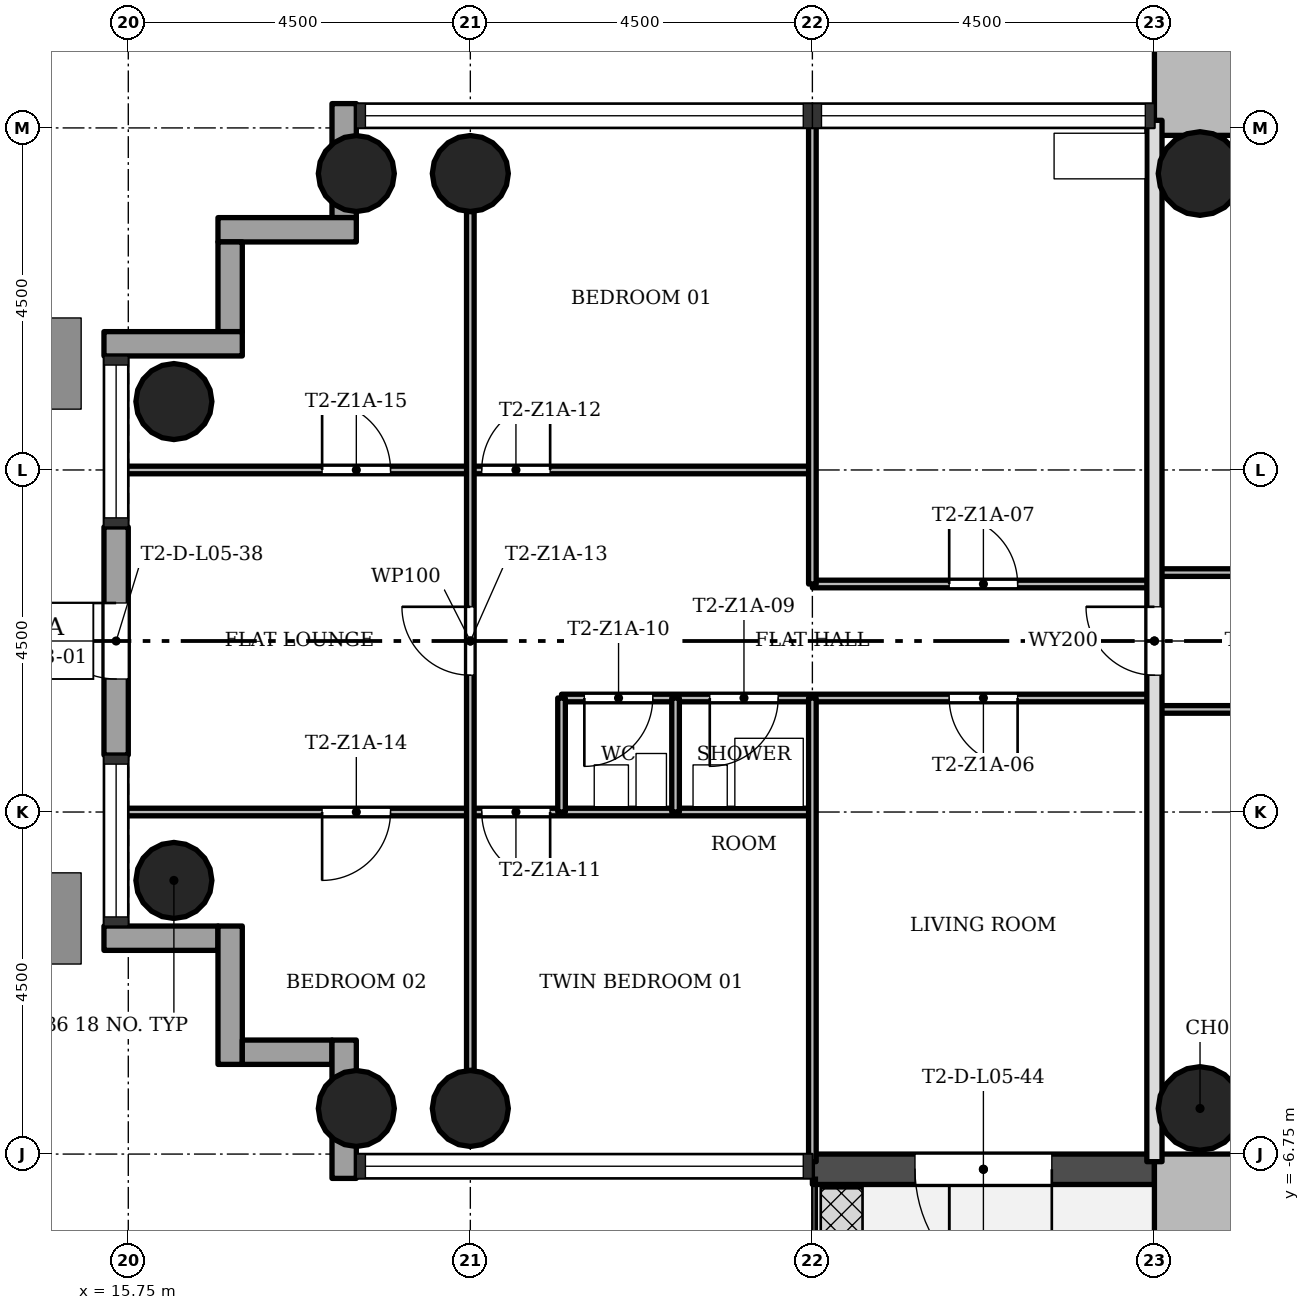
"""IFC4 building model, lengths in metres.
Left out: names, types, materials, properties, quantities, classifications, styles, units other than length and angle.
Written with IfcOpenShell. Run it as: python <this file> out.ifc"""

import sys

from ifc_helpers import new_model, si_unit, direction, frame, frame_2d, origin, origin_2d, place, context, subcontext, project, spatial, rectangle, hollow_circle, extrude, element, fill, save


model = new_model("IFC4")
c1 = context("Model", 3, precision=1e-05, world=origin(), true_north=direction((0.0, 1.0)))
c2 = subcontext(c1, "Body", "Model", "MODEL_VIEW")
j1 = project(units=[si_unit("LENGTHUNIT", "METRE"), si_unit("PLANEANGLEUNIT", "RADIAN")], contexts=[c1])
p1 = place(None, origin())
s1 = spatial("IfcSite", under=j1, at=p1, CompositionType="ELEMENT")
p2 = place(p1, origin())
s2 = spatial("IfcBuilding", under=s1, at=p2, CompositionType="ELEMENT")
p3 = place(p2, frame((0.0, 0.0, 24.5)))
s3 = spatial("IfcBuildingStorey", under=s2, at=p3, CompositionType="ELEMENT", Elevation=24.5)
p4 = place(p3, frame((29.8, 15.248, 0.0), z_axis=(0.0, 0.0, 1.0), x_axis=(0.0, -1.0, 0.0)))
e1 = element("IfcWall", 1, at=p4, inside=s3, PredefinedType="SHEAR", context=c2, shape_type="SweptSolid", body=[
    extrude(rectangle(XDim=8.596, YDim=1.1, at=frame_2d((4.298, 0.0))), origin(), (0.0, 0.0, 1.0), 3.4),
])
p5 = place(p3, frame((41.65, -7.3, 0.0), z_axis=(0.0, 0.0, 1.0), x_axis=(-1.0, 0.0, 0.0)))
e2 = element("IfcWall", 2, at=p5, inside=s3, PredefinedType="SHEAR", context=c2, shape_type="SweptSolid", body=[
    extrude(rectangle(XDim=12.4, YDim=1.1, at=frame_2d((6.2, 0.0))), origin(), (0.0, 0.0, 1.0), 3.4),
])
p6 = place(p5, frame((4.75, 0.0, 0.0)))
e3 = element("IfcOpeningElement", 3, at=p6, cuts=e2, PredefinedType="OPENING", context=c2, shape_type="SweptSolid", body=[
    extrude(rectangle(XDim=1.8, YDim=2.1, at=frame_2d((0.9, 1.05))), frame((0.0, 0.56, 0.0), z_axis=(0.0, -1.0, 0.0), x_axis=(1.0, 0.0, 0.0)), (0.0, 0.0, 1.0), 1.12),
])
for number, where, z_axis, x_axis in (
    (4, (20.25, 6.15, 0.0), (0.0, 0.0, 1.0), (1.0, 0.0, 0.0)),
    (5, (20.25, -6.15, 0.0), (0.0, 0.0, 1.0), (1.0, 0.0, 0.0)),
    (6, (18.75, 6.15, 0.0), (0.0, 0.0, 1.0), (1.0, 0.0, 0.0)),
    (7, (18.75, -6.15, 0.0), (0.0, 0.0, 1.0), (1.0, 0.0, 0.0)),
    (8, (16.35, 3.15, 0.0), (0.0, 0.0, 1.0), (1.0, 0.0, 0.0)),
    (9, (16.35, -3.15, 0.0), (0.0, 0.0, 1.0), (1.0, 0.0, 0.0)),
):
    element("IfcColumn", number, at=place(p3, frame(where, z_axis=z_axis, x_axis=x_axis)), inside=s3, PredefinedType="COLUMN", context=c2, shape_type="SweptSolid", body=[
        extrude(hollow_circle(Radius=0.5, WallThickness=0.036, at=origin_2d()), origin(), (0.0, 0.0, 1.0), 3.4),
    ])
for number, where, z_axis, x_axis in (
    (10, (29.85, 6.15, 0.0), (0.0, 0.0, 1.0), (1.0, 0.0, 0.0)),
    (11, (29.85, -6.15, 0.0), (0.0, 0.0, 1.0), (1.0, 0.0, 0.0)),
):
    element("IfcColumn", number, at=place(p3, frame(where, z_axis=z_axis, x_axis=x_axis)), inside=s3, PredefinedType="COLUMN", context=c2, shape_type="SweptSolid", body=[
        extrude(hollow_circle(Radius=0.55, WallThickness=0.04, at=origin_2d()), origin(), (0.0, 0.0, 1.0), 3.4),
    ])
p7 = place(p3, frame((18.59, 7.07, 0.0), z_axis=(0.0, 0.0, 1.0), x_axis=(0.0, -1.0, 0.0)))
e12 = element("IfcWall", 12, at=p7, inside=s3, PredefinedType="STANDARD", context=c2, shape_type="SweptSolid", body=[
    extrude(rectangle(XDim=1.5, YDim=0.32, at=frame_2d((0.75, 0.0))), origin(), (0.0, 0.0, 1.0), 3.1),
])
p8 = place(p3, frame((18.75, 5.41, 0.0), z_axis=(0.0, 0.0, 1.0), x_axis=(-1.0, 0.0, 0.0)))
e13 = element("IfcWall", 13, at=p8, inside=s3, PredefinedType="STANDARD", context=c2, shape_type="SweptSolid", body=[
    extrude(rectangle(XDim=1.82, YDim=0.32, at=frame_2d((0.91, 0.0))), origin(), (0.0, 0.0, 1.0), 3.1),
])
p9 = place(p3, frame((17.09, 5.25, 0.0), z_axis=(0.0, 0.0, 1.0), x_axis=(0.0, -1.0, 0.0)))
e14 = element("IfcWall", 14, at=p9, inside=s3, PredefinedType="STANDARD", context=c2, shape_type="SweptSolid", body=[
    extrude(rectangle(XDim=1.18, YDim=0.32, at=frame_2d((0.59, 0.0))), origin(), (0.0, 0.0, 1.0), 3.1),
])
p10 = place(p3, frame((17.25, 3.91, 0.0), z_axis=(0.0, 0.0, 1.0), x_axis=(-1.0, 0.0, 0.0)))
e15 = element("IfcWall", 15, at=p10, inside=s3, PredefinedType="STANDARD", context=c2, shape_type="SweptSolid", body=[
    extrude(rectangle(XDim=1.82, YDim=0.32, at=frame_2d((0.91, 0.0))), origin(), (0.0, 0.0, 1.0), 3.1),
])
p11 = place(p3, frame((15.59, 1.5, 0.0), z_axis=(0.0, 0.0, 1.0), x_axis=(0.0, -1.0, 0.0)))
e16 = element("IfcWall", 16, at=p11, inside=s3, PredefinedType="STANDARD", context=c2, shape_type="SweptSolid", body=[
    extrude(rectangle(XDim=3.0, YDim=0.32, at=frame_2d((1.5, 0.0))), origin(), (0.0, 0.0, 1.0), 3.1),
])
p12 = place(p11, frame((1.0, 0.0, 0.0)))
e17 = element("IfcOpeningElement", 17, at=p12, cuts=e16, PredefinedType="OPENING", context=c2, shape_type="SweptSolid", body=[
    extrude(rectangle(XDim=1.0, YDim=2.1, at=frame_2d((0.5, 1.05))), frame((0.0, 0.17, 0.0), z_axis=(0.0, -1.0, 0.0), x_axis=(1.0, 0.0, 0.0)), (0.0, 0.0, 1.0), 0.34),
])
p13 = place(p3, frame((15.43, -3.91, 0.0), z_axis=(0.0, 0.0, 1.0), x_axis=(1.0, 0.0, 0.0)))
e18 = element("IfcWall", 18, at=p13, inside=s3, PredefinedType="STANDARD", context=c2, shape_type="SweptSolid", body=[
    extrude(rectangle(XDim=1.5, YDim=0.32, at=frame_2d((0.75, 0.0))), origin(), (0.0, 0.0, 1.0), 3.1),
])
p14 = place(p3, frame((17.09, -3.75, 0.0), z_axis=(0.0, 0.0, 1.0), x_axis=(0.0, -1.0, 0.0)))
e19 = element("IfcWall", 19, at=p14, inside=s3, PredefinedType="STANDARD", context=c2, shape_type="SweptSolid", body=[
    extrude(rectangle(XDim=1.82, YDim=0.32, at=frame_2d((0.91, 0.0))), origin(), (0.0, 0.0, 1.0), 3.1),
])
p15 = place(p3, frame((17.25, -5.41, 0.0), z_axis=(0.0, 0.0, 1.0), x_axis=(1.0, 0.0, 0.0)))
e20 = element("IfcWall", 20, at=p15, inside=s3, PredefinedType="STANDARD", context=c2, shape_type="SweptSolid", body=[
    extrude(rectangle(XDim=1.18, YDim=0.32, at=frame_2d((0.59, 0.0))), origin(), (0.0, 0.0, 1.0), 3.1),
])
p16 = place(p3, frame((18.59, -5.25, 0.0), z_axis=(0.0, 0.0, 1.0), x_axis=(0.0, -1.0, 0.0)))
e21 = element("IfcWall", 21, at=p16, inside=s3, PredefinedType="STANDARD", context=c2, shape_type="SweptSolid", body=[
    extrude(rectangle(XDim=1.82, YDim=0.32, at=frame_2d((0.91, 0.0))), origin(), (0.0, 0.0, 1.0), 3.1),
])
p17 = place(p3, frame((24.75, -6.95, 0.0), z_axis=(0.0, 0.0, 1.0), x_axis=(1.0, 0.0, 0.0)))
e22 = element("IfcWall", 22, at=p17, inside=s3, PredefinedType="STANDARD", context=c2, shape_type="SweptSolid", body=[
    extrude(rectangle(XDim=4.5, YDim=0.4, at=frame_2d((2.25, 0.0))), origin(), (0.0, 0.0, 1.0), 3.1),
])
p18 = place(p17, frame((1.35, 0.0, 0.0)))
e23 = element("IfcOpeningElement", 23, at=p18, cuts=e22, PredefinedType="OPENING", context=c2, shape_type="SweptSolid", body=[
    extrude(rectangle(XDim=1.8, YDim=2.1, at=frame_2d((0.9, 1.05))), frame((0.0, 0.21, 0.0), z_axis=(0.0, -1.0, 0.0), x_axis=(1.0, 0.0, 0.0)), (0.0, 0.0, 1.0), 0.42),
])
p19 = place(p3, frame((24.75, -2.25, 0.0), z_axis=(0.0, 0.0, 1.0), x_axis=(-1.0, 0.0, 0.0)))
e24 = element("IfcWall", 24, at=p19, inside=s3, PredefinedType="PARTITIONING", context=c2, shape_type="SweptSolid", body=[
    extrude(rectangle(XDim=9.1, YDim=0.1, at=frame_2d((4.55, 0.0))), origin(), (0.0, 0.0, 1.0), 3.0),
])
p20 = place(p19, frame((3.45, 0.0, 0.0)))
e25 = element("IfcOpeningElement", 25, at=p20, cuts=e24, PredefinedType="OPENING", context=c2, shape_type="SweptSolid", body=[
    extrude(rectangle(XDim=0.9, YDim=2.1, at=frame_2d((0.45, 1.05))), frame((0.0, 0.06, 0.0), z_axis=(0.0, -1.0, 0.0), x_axis=(1.0, 0.0, 0.0)), (0.0, 0.0, 1.0), 0.12),
])
p21 = place(p19, frame((5.55, 0.0, 0.0)))
e26 = element("IfcOpeningElement", 26, at=p21, cuts=e24, PredefinedType="OPENING", context=c2, shape_type="SweptSolid", body=[
    extrude(rectangle(XDim=0.9, YDim=2.1, at=frame_2d((0.45, 1.05))), frame((0.0, 0.06, 0.0), z_axis=(0.0, -1.0, 0.0), x_axis=(1.0, 0.0, 0.0)), (0.0, 0.0, 1.0), 0.12),
])
p22 = place(p3, frame((34.5, -0.9, 0.0), z_axis=(0.0, 0.0, 1.0), x_axis=(-1.0, 0.0, 0.0)))
e27 = element("IfcWall", 27, at=p22, inside=s3, PredefinedType="PARTITIONING", context=c2, shape_type="SweptSolid", body=[
    extrude(rectangle(XDim=5.25, YDim=0.1, at=frame_2d((2.625, 0.0))), origin(), (0.0, 0.0, 1.0), 3.0),
])
p23 = place(p3, frame((29.25, -0.75, 0.0), z_axis=(0.0, 0.0, 1.0), x_axis=(-1.0, 0.0, 0.0)))
e28 = element("IfcWall", 28, at=p23, inside=s3, PredefinedType="PARTITIONING", context=c2, shape_type="SweptSolid", body=[
    extrude(rectangle(XDim=7.8, YDim=0.1, at=frame_2d((3.9, 0.0))), origin(), (0.0, 0.0, 1.0), 3.0),
])
p24 = place(p23, frame((1.8, 0.0, 0.0)))
e29 = element("IfcOpeningElement", 29, at=p24, cuts=e28, PredefinedType="OPENING", context=c2, shape_type="SweptSolid", body=[
    extrude(rectangle(XDim=0.9, YDim=2.1, at=frame_2d((0.45, 1.05))), frame((0.0, 0.06, 0.0), z_axis=(0.0, -1.0, 0.0), x_axis=(1.0, 0.0, 0.0)), (0.0, 0.0, 1.0), 0.12),
])
p25 = place(p23, frame((4.95, 0.0, 0.0)))
e30 = element("IfcOpeningElement", 30, at=p25, cuts=e28, PredefinedType="OPENING", context=c2, shape_type="SweptSolid", body=[
    extrude(rectangle(XDim=0.9, YDim=2.1, at=frame_2d((0.45, 1.05))), frame((0.0, 0.06, 0.0), z_axis=(0.0, -1.0, 0.0), x_axis=(1.0, 0.0, 0.0)), (0.0, 0.0, 1.0), 0.12),
])
p26 = place(p23, frame((6.6, 0.0, 0.0)))
e31 = element("IfcOpeningElement", 31, at=p26, cuts=e28, PredefinedType="OPENING", context=c2, shape_type="SweptSolid", body=[
    extrude(rectangle(XDim=0.9, YDim=2.1, at=frame_2d((0.45, 1.05))), frame((0.0, 0.06, 0.0), z_axis=(0.0, -1.0, 0.0), x_axis=(1.0, 0.0, 0.0)), (0.0, 0.0, 1.0), 0.12),
])
p27 = place(p3, frame((29.25, 0.75, 0.0), z_axis=(0.0, 0.0, 1.0), x_axis=(-1.0, 0.0, 0.0)))
e32 = element("IfcWall", 32, at=p27, inside=s3, PredefinedType="PARTITIONING", context=c2, shape_type="SweptSolid", body=[
    extrude(rectangle(XDim=4.5, YDim=0.1, at=frame_2d((2.25, 0.0))), origin(), (0.0, 0.0, 1.0), 3.0),
])
p28 = place(p27, frame((1.8, 0.0, 0.0)))
e33 = element("IfcOpeningElement", 33, at=p28, cuts=e32, PredefinedType="OPENING", context=c2, shape_type="SweptSolid", body=[
    extrude(rectangle(XDim=0.9, YDim=2.1, at=frame_2d((0.45, 1.05))), frame((0.0, 0.06, 0.0), z_axis=(0.0, -1.0, 0.0), x_axis=(1.0, 0.0, 0.0)), (0.0, 0.0, 1.0), 0.12),
])
p29 = place(p3, frame((34.5, 0.9, 0.0), z_axis=(0.0, 0.0, 1.0), x_axis=(-1.0, 0.0, 0.0)))
e34 = element("IfcWall", 34, at=p29, inside=s3, PredefinedType="PARTITIONING", context=c2, shape_type="SweptSolid", body=[
    extrude(rectangle(XDim=5.25, YDim=0.1, at=frame_2d((2.625, 0.0))), origin(), (0.0, 0.0, 1.0), 3.0),
])
p30 = place(p3, frame((24.75, 2.25, 0.0), z_axis=(0.0, 0.0, 1.0), x_axis=(-1.0, 0.0, 0.0)))
e35 = element("IfcWall", 35, at=p30, inside=s3, PredefinedType="PARTITIONING", context=c2, shape_type="SweptSolid", body=[
    extrude(rectangle(XDim=9.1, YDim=0.1, at=frame_2d((4.55, 0.0))), origin(), (0.0, 0.0, 1.0), 3.0),
])
p31 = place(p30, frame((3.45, 0.0, 0.0)))
e36 = element("IfcOpeningElement", 36, at=p31, cuts=e35, PredefinedType="OPENING", context=c2, shape_type="SweptSolid", body=[
    extrude(rectangle(XDim=0.9, YDim=2.1, at=frame_2d((0.45, 1.05))), frame((0.0, 0.06, 0.0), z_axis=(0.0, -1.0, 0.0), x_axis=(1.0, 0.0, 0.0)), (0.0, 0.0, 1.0), 0.12),
])
p32 = place(p30, frame((5.55, 0.0, 0.0)))
e37 = element("IfcOpeningElement", 37, at=p32, cuts=e35, PredefinedType="OPENING", context=c2, shape_type="SweptSolid", body=[
    extrude(rectangle(XDim=0.9, YDim=2.1, at=frame_2d((0.45, 1.05))), frame((0.0, 0.06, 0.0), z_axis=(0.0, -1.0, 0.0), x_axis=(1.0, 0.0, 0.0)), (0.0, 0.0, 1.0), 0.12),
])
p33 = place(p3, frame((29.25, -6.85, 0.0), z_axis=(0.0, 0.0, 1.0), x_axis=(0.0, 1.0, 0.0)))
e38 = element("IfcWall", 38, at=p33, inside=s3, PredefinedType="SOLIDWALL", context=c2, shape_type="SweptSolid", body=[
    extrude(rectangle(XDim=13.7, YDim=0.2, at=frame_2d((6.85, 0.0))), origin(), (0.0, 0.0, 1.0), 3.0),
])
p34 = place(p33, frame((6.4, 0.0, 0.0)))
e39 = element("IfcOpeningElement", 39, at=p34, cuts=e38, PredefinedType="OPENING", context=c2, shape_type="SweptSolid", body=[
    extrude(rectangle(XDim=0.9, YDim=2.1, at=frame_2d((0.45, 1.05))), frame((0.0, 0.11, 0.0), z_axis=(0.0, -1.0, 0.0), x_axis=(1.0, 0.0, 0.0)), (0.0, 0.0, 1.0), 0.22),
])
for number, where, z_axis, x_axis in (
    (40, (24.75, -6.85, 0.0), (0.0, 0.0, 1.0), (0.0, 1.0, 0.0)),
    (41, (24.75, 0.75, 0.0), (0.0, 0.0, 1.0), (0.0, 1.0, 0.0)),
):
    element("IfcWall", number, at=place(p3, frame(where, z_axis=z_axis, x_axis=x_axis)), inside=s3, PredefinedType="PARTITIONING", context=c2, shape_type="SweptSolid", body=[
        extrude(rectangle(XDim=6.1, YDim=0.1, at=frame_2d((3.05, 0.0))), origin(), (0.0, 0.0, 1.0), 3.0),
    ])
for number, where, z_axis, x_axis in (
    (42, (22.95, -2.25, 0.0), (0.0, 0.0, 1.0), (0.0, 1.0, 0.0)),
    (43, (21.45, -2.25, 0.0), (0.0, 0.0, 1.0), (0.0, 1.0, 0.0)),
):
    element("IfcWall", number, at=place(p3, frame(where, z_axis=z_axis, x_axis=x_axis)), inside=s3, PredefinedType="PARTITIONING", context=c2, shape_type="SweptSolid", body=[
        extrude(rectangle(XDim=1.5, YDim=0.1, at=frame_2d((0.75, 0.0))), origin(), (0.0, 0.0, 1.0), 3.0),
    ])
p35 = place(p3, frame((20.25, -5.65, 0.0), z_axis=(0.0, 0.0, 1.0), x_axis=(0.0, 1.0, 0.0)))
e44 = element("IfcWall", 44, at=p35, inside=s3, PredefinedType="PARTITIONING", context=c2, shape_type="SweptSolid", body=[
    extrude(rectangle(XDim=11.3, YDim=0.1, at=frame_2d((5.65, 0.0))), origin(), (0.0, 0.0, 1.0), 3.0),
])
p36 = place(p35, frame((5.2, 0.0, 0.0)))
e45 = element("IfcOpeningElement", 45, at=p36, cuts=e44, PredefinedType="OPENING", context=c2, shape_type="SweptSolid", body=[
    extrude(rectangle(XDim=0.9, YDim=2.1, at=frame_2d((0.45, 1.05))), frame((0.0, 0.06, 0.0), z_axis=(0.0, -1.0, 0.0), x_axis=(1.0, 0.0, 0.0)), (0.0, 0.0, 1.0), 0.12),
])
p37 = place(p12, origin())
e46 = element("IfcDoor", 46, at=p37, inside=s3, OperationType="SINGLE_SWING_LEFT", PredefinedType="DOOR", context=c2, shape_type="SweptSolid", body=[
    extrude(rectangle(XDim=1.0, YDim=2.1, at=frame_2d((0.5, 1.05))), frame((0.0, 0.025, 0.0), z_axis=(0.0, -1.0, 0.0), x_axis=(1.0, 0.0, 0.0)), (0.0, 0.0, 1.0), 0.05),
])
fill(e17, e46)
p38 = place(p18, origin())
e47 = element("IfcDoor", 47, at=p38, inside=s3, OperationType="SINGLE_SWING_RIGHT", PredefinedType="DOOR", context=c2, shape_type="SweptSolid", body=[
    extrude(rectangle(XDim=1.8, YDim=2.1, at=frame_2d((0.9, 1.05))), frame((0.0, 0.025, 0.0), z_axis=(0.0, -1.0, 0.0), x_axis=(1.0, 0.0, 0.0)), (0.0, 0.0, 1.0), 0.05),
])
fill(e23, e47)
p39 = place(p24, origin())
e48 = element("IfcDoor", 48, at=p39, inside=s3, OperationType="SINGLE_SWING_RIGHT", PredefinedType="DOOR", context=c2, shape_type="SweptSolid", body=[
    extrude(rectangle(XDim=0.9, YDim=2.1, at=frame_2d((0.45, 1.05))), frame((0.0, 0.025, 0.0), z_axis=(0.0, -1.0, 0.0), x_axis=(1.0, 0.0, 0.0)), (0.0, 0.0, 1.0), 0.05),
])
fill(e29, e48)
p40 = place(p28, origin())
e49 = element("IfcDoor", 49, at=p40, inside=s3, OperationType="SINGLE_SWING_RIGHT", PredefinedType="DOOR", context=c2, shape_type="SweptSolid", body=[
    extrude(rectangle(XDim=0.9, YDim=2.1, at=frame_2d((0.45, 1.05))), frame((0.0, 0.025, 0.0), z_axis=(0.0, -1.0, 0.0), x_axis=(1.0, 0.0, 0.0)), (0.0, 0.0, 1.0), 0.05),
])
fill(e33, e49)
p41 = place(p34, origin())
e50 = element("IfcDoor", 50, at=p41, inside=s3, OperationType="SINGLE_SWING_LEFT", PredefinedType="DOOR", context=c2, shape_type="SweptSolid", body=[
    extrude(rectangle(XDim=0.9, YDim=2.1, at=frame_2d((0.45, 1.05))), frame((0.0, 0.025, 0.0), z_axis=(0.0, -1.0, 0.0), x_axis=(1.0, 0.0, 0.0)), (0.0, 0.0, 1.0), 0.05),
])
fill(e39, e50)
p42 = place(p25, origin())
e51 = element("IfcDoor", 51, at=p42, inside=s3, OperationType="SINGLE_SWING_LEFT", PredefinedType="DOOR", context=c2, shape_type="SweptSolid", body=[
    extrude(rectangle(XDim=0.9, YDim=2.1, at=frame_2d((0.45, 1.05))), frame((0.0, 0.025, 0.0), z_axis=(0.0, -1.0, 0.0), x_axis=(1.0, 0.0, 0.0)), (0.0, 0.0, 1.0), 0.05),
])
fill(e30, e51)
p43 = place(p26, origin())
e52 = element("IfcDoor", 52, at=p43, inside=s3, OperationType="SINGLE_SWING_LEFT", PredefinedType="DOOR", context=c2, shape_type="SweptSolid", body=[
    extrude(rectangle(XDim=0.9, YDim=2.1, at=frame_2d((0.45, 1.05))), frame((0.0, 0.025, 0.0), z_axis=(0.0, -1.0, 0.0), x_axis=(1.0, 0.0, 0.0)), (0.0, 0.0, 1.0), 0.05),
])
fill(e31, e52)
p44 = place(p20, origin())
e53 = element("IfcDoor", 53, at=p44, inside=s3, OperationType="SINGLE_SWING_RIGHT", PredefinedType="DOOR", context=c2, shape_type="SweptSolid", body=[
    extrude(rectangle(XDim=0.9, YDim=2.1, at=frame_2d((0.45, 1.05))), frame((0.0, 0.025, 0.0), z_axis=(0.0, -1.0, 0.0), x_axis=(1.0, 0.0, 0.0)), (0.0, 0.0, 1.0), 0.05),
])
fill(e25, e53)
p45 = place(p31, origin())
e54 = element("IfcDoor", 54, at=p45, inside=s3, OperationType="SINGLE_SWING_LEFT", PredefinedType="DOOR", context=c2, shape_type="SweptSolid", body=[
    extrude(rectangle(XDim=0.9, YDim=2.1, at=frame_2d((0.45, 1.05))), frame((0.0, 0.025, 0.0), z_axis=(0.0, -1.0, 0.0), x_axis=(1.0, 0.0, 0.0)), (0.0, 0.0, 1.0), 0.05),
])
fill(e36, e54)
p46 = place(p36, origin())
e55 = element("IfcDoor", 55, at=p46, inside=s3, OperationType="SINGLE_SWING_LEFT", PredefinedType="DOOR", context=c2, shape_type="SweptSolid", body=[
    extrude(rectangle(XDim=0.9, YDim=2.1, at=frame_2d((0.45, 1.05))), frame((0.0, 0.025, 0.0), z_axis=(0.0, -1.0, 0.0), x_axis=(1.0, 0.0, 0.0)), (0.0, 0.0, 1.0), 0.05),
])
fill(e45, e55)
p47 = place(p21, origin())
e56 = element("IfcDoor", 56, at=p47, inside=s3, OperationType="SINGLE_SWING_LEFT", PredefinedType="DOOR", context=c2, shape_type="SweptSolid", body=[
    extrude(rectangle(XDim=0.9, YDim=2.1, at=frame_2d((0.45, 1.05))), frame((0.0, 0.025, 0.0), z_axis=(0.0, -1.0, 0.0), x_axis=(1.0, 0.0, 0.0)), (0.0, 0.0, 1.0), 0.05),
])
fill(e26, e56)
p48 = place(p32, origin())
e57 = element("IfcDoor", 57, at=p48, inside=s3, OperationType="SINGLE_SWING_RIGHT", PredefinedType="DOOR", context=c2, shape_type="SweptSolid", body=[
    extrude(rectangle(XDim=0.9, YDim=2.1, at=frame_2d((0.45, 1.05))), frame((0.0, 0.025, 0.0), z_axis=(0.0, -1.0, 0.0), x_axis=(1.0, 0.0, 0.0)), (0.0, 0.0, 1.0), 0.05),
])
fill(e37, e57)
save(model, sys.argv[1])
